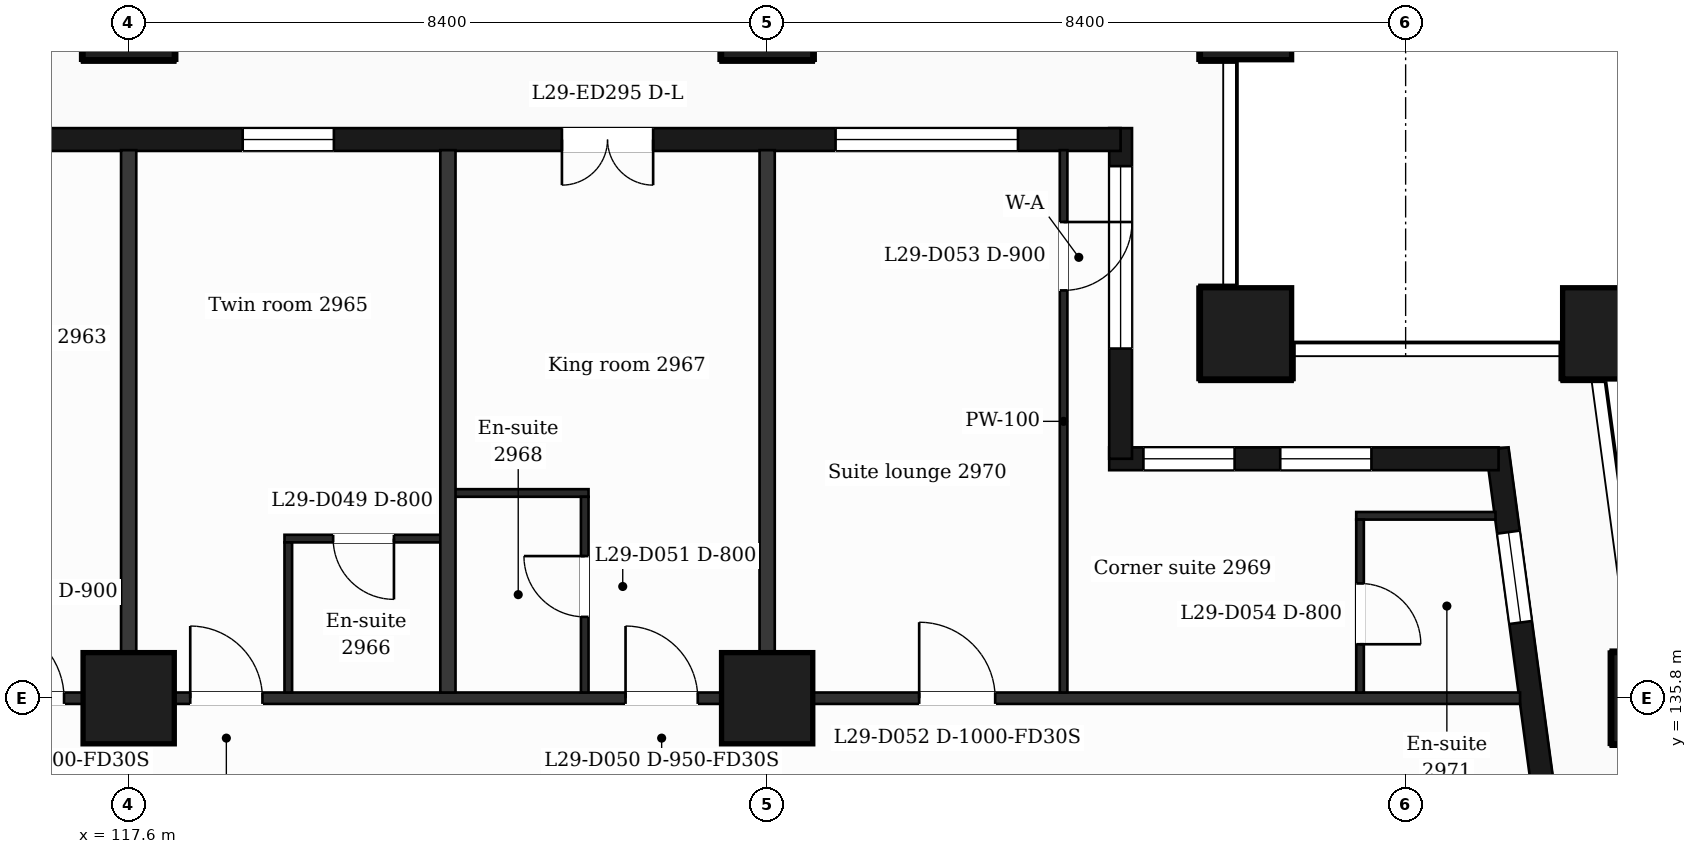
"""IFC4 building model, lengths in metres.
Left out: names, types, materials, properties, quantities, classifications, styles, units other than length and angle.
Written with IfcOpenShell. Run it as: python <this file> out.ifc"""

import sys

from ifc_helpers import new_model, si_unit, direction, frame, frame_2d, origin, origin_2d, place, context, subcontext, project, spatial, rectangle, extrude, element, fill, save


model = new_model("IFC4")
c1 = context("Model", 3, precision=1e-05, world=origin(), true_north=direction((0.0, 1.0)))
c2 = subcontext(c1, "Body", "Model", "MODEL_VIEW")
j1 = project(units=[si_unit("LENGTHUNIT", "METRE"), si_unit("PLANEANGLEUNIT", "RADIAN")], contexts=[c1])
p1 = place(None, origin())
s1 = spatial("IfcSite", under=j1, at=p1, CompositionType="ELEMENT")
p2 = place(p1, origin())
s2 = spatial("IfcBuilding", under=s1, at=p2, CompositionType="ELEMENT")
p3 = place(p2, frame((0.0, 0.0, 124.3)))
s3 = spatial("IfcBuildingStorey", under=s2, at=p3, CompositionType="ELEMENT", Elevation=124.3)
for number, where, z_axis, x_axis in (
    (1, (132.3, 140.6, 0.0), (0.0, 0.0, 1.0), (1.0, 0.0, 0.0)),
    (2, (137.065, 140.6, 0.0), (0.0, 0.0, 1.0), (1.0, 0.0, 0.0)),
    (3, (117.6, 135.8, 0.0), (0.0, 0.0, 1.0), (1.0, 0.0, 0.0)),
    (4, (126.0, 135.8, 0.0), (0.0, 0.0, 1.0), (1.0, 0.0, 0.0)),
    (5, (137.711, 135.8, 0.0), (0.0, 0.0, 1.0), (1.0, 0.0, 0.0)),
    (6, (117.6, 144.8, 0.0), (0.0, 0.0, 1.0), (1.0, 0.0, 0.0)),
    (7, (126.0, 144.8, 0.0), (0.0, 0.0, 1.0), (1.0, 0.0, 0.0)),
    (8, (132.3, 144.8, 0.0), (0.0, 0.0, 1.0), (1.0, 0.0, 0.0)),
):
    element("IfcColumn", number, at=place(p3, frame(where, z_axis=z_axis, x_axis=x_axis)), inside=s3, PredefinedType="COLUMN", context=c2, shape_type="SweptSolid", body=[
        extrude(rectangle(XDim=1.2, YDim=1.2, at=origin_2d()), origin(), (0.0, 0.0, 1.0), 3.7),
    ])
p4 = place(p3, frame((136.504, 132.4, 0.0), z_axis=(0.0, 0.0, 1.0), x_axis=(-0.133399697462, 0.99106231929, 0.0)))
e9 = element("IfcWall", 9, at=p4, inside=s3, PredefinedType="SOLIDWALL", context=c2, shape_type="SweptSolid", body=[
    extrude(rectangle(XDim=6.74, YDim=0.3, at=frame_2d((3.37, 0.0))), origin(), (0.0, 0.0, 1.0), 3.38),
])
p5 = place(p4, frame((1.115, 0.0, 0.0)))
e10 = element("IfcOpeningElement", 10, at=p5, cuts=e9, PredefinedType="OPENING", context=c2, shape_type="SweptSolid", body=[
    extrude(rectangle(XDim=1.2, YDim=2.4, at=frame_2d((0.6, 1.2))), frame((0.0, 0.16, 0.0), z_axis=(0.0, -1.0, 0.0), x_axis=(1.0, 0.0, 0.0)), (0.0, 0.0, 1.0), 0.32),
])
p6 = place(p4, frame((4.436, 0.0, 0.9)))
e11 = element("IfcOpeningElement", 11, at=p6, cuts=e9, PredefinedType="OPENING", context=c2, shape_type="SweptSolid", body=[
    extrude(rectangle(XDim=1.2, YDim=2.1, at=frame_2d((0.6, 1.05))), frame((0.0, 0.16, 0.0), z_axis=(0.0, -1.0, 0.0), x_axis=(1.0, 0.0, 0.0)), (0.0, 0.0, 1.0), 0.32),
])
p7 = place(p3, frame((135.623, 138.95, 0.0), z_axis=(0.0, 0.0, 1.0), x_axis=(-1.0, 0.0, 0.0)))
e12 = element("IfcWall", 12, at=p7, inside=s3, PredefinedType="SOLIDWALL", context=c2, shape_type="SweptSolid", body=[
    extrude(rectangle(XDim=5.123, YDim=0.3, at=frame_2d((2.561, 0.0))), origin(), (0.0, 0.0, 1.0), 3.38),
])
p8 = place(p7, frame((1.673, 0.0, 0.9)))
e13 = element("IfcOpeningElement", 13, at=p8, cuts=e12, PredefinedType="OPENING", context=c2, shape_type="SweptSolid", body=[
    extrude(rectangle(XDim=1.2, YDim=2.1, at=frame_2d((0.6, 1.05))), frame((0.0, 0.16, 0.0), z_axis=(0.0, -1.0, 0.0), x_axis=(1.0, 0.0, 0.0)), (0.0, 0.0, 1.0), 0.32),
])
p9 = place(p7, frame((3.473, 0.0, 0.9)))
e14 = element("IfcOpeningElement", 14, at=p9, cuts=e12, PredefinedType="OPENING", context=c2, shape_type="SweptSolid", body=[
    extrude(rectangle(XDim=1.2, YDim=2.1, at=frame_2d((0.6, 1.05))), frame((0.0, 0.16, 0.0), z_axis=(0.0, -1.0, 0.0), x_axis=(1.0, 0.0, 0.0)), (0.0, 0.0, 1.0), 0.32),
])
p10 = place(p3, frame((130.65, 138.95, 0.0), z_axis=(0.0, 0.0, 1.0), x_axis=(0.0, 1.0, 0.0)))
e15 = element("IfcWall", 15, at=p10, inside=s3, PredefinedType="SOLIDWALL", context=c2, shape_type="SweptSolid", body=[
    extrude(rectangle(XDim=4.35, YDim=0.3, at=frame_2d((2.175, 0.0))), origin(), (0.0, 0.0, 1.0), 3.38),
])
p11 = place(p10, frame((1.45, 0.0, 0.9)))
e16 = element("IfcOpeningElement", 16, at=p11, cuts=e15, PredefinedType="OPENING", context=c2, shape_type="SweptSolid", body=[
    extrude(rectangle(XDim=2.4, YDim=2.1, at=frame_2d((1.2, 1.05))), frame((0.0, 0.16, 0.0), z_axis=(0.0, -1.0, 0.0), x_axis=(1.0, 0.0, 0.0)), (0.0, 0.0, 1.0), 0.32),
])
p12 = place(p3, frame((130.65, 143.15, 0.0), z_axis=(0.0, 0.0, 1.0), x_axis=(-1.0, 0.0, 0.0)))
e17 = element("IfcWall", 17, at=p12, inside=s3, PredefinedType="SOLIDWALL", context=c2, shape_type="SweptSolid", body=[
    extrude(rectangle(XDim=14.25, YDim=0.3, at=frame_2d((7.125, 0.0))), origin(), (0.0, 0.0, 1.0), 3.38),
])
p13 = place(p12, frame((1.35, 0.0, 0.9)))
e18 = element("IfcOpeningElement", 18, at=p13, cuts=e17, PredefinedType="OPENING", context=c2, shape_type="SweptSolid", body=[
    extrude(rectangle(XDim=2.4, YDim=2.1, at=frame_2d((1.2, 1.05))), frame((0.0, 0.16, 0.0), z_axis=(0.0, -1.0, 0.0), x_axis=(1.0, 0.0, 0.0)), (0.0, 0.0, 1.0), 0.32),
])
p14 = place(p12, frame((6.15, 0.0, 0.0)))
e19 = element("IfcOpeningElement", 19, at=p14, cuts=e17, PredefinedType="OPENING", context=c2, shape_type="SweptSolid", body=[
    extrude(rectangle(XDim=1.2, YDim=2.4, at=frame_2d((0.6, 1.2))), frame((0.0, 0.16, 0.0), z_axis=(0.0, -1.0, 0.0), x_axis=(1.0, 0.0, 0.0)), (0.0, 0.0, 1.0), 0.32),
])
p15 = place(p12, frame((10.35, 0.0, 0.9)))
e20 = element("IfcOpeningElement", 20, at=p15, cuts=e17, PredefinedType="OPENING", context=c2, shape_type="SweptSolid", body=[
    extrude(rectangle(XDim=1.2, YDim=2.1, at=frame_2d((0.6, 1.05))), frame((0.0, 0.16, 0.0), z_axis=(0.0, -1.0, 0.0), x_axis=(1.0, 0.0, 0.0)), (0.0, 0.0, 1.0), 0.32),
])
p16 = place(p3, frame((90.895, 135.8, 0.0), z_axis=(0.0, 0.0, 1.0), x_axis=(1.0, 0.0, 0.0)))
e21 = element("IfcWall", 21, at=p16, inside=s3, PredefinedType="PARTITIONING", context=c2, shape_type="SweptSolid", body=[
    extrude(rectangle(XDim=45.011, YDim=0.15, at=frame_2d((22.505, 0.0))), origin(), (0.0, 0.0, 1.0), 3.38),
])
p17 = place(p16, frame((8.005, 0.0, 0.0)))
e22 = element("IfcOpeningElement", 22, at=p17, cuts=e21, PredefinedType="OPENING", context=c2, shape_type="SweptSolid", body=[
    extrude(rectangle(XDim=1.0, YDim=2.1, at=frame_2d((0.5, 1.05))), frame((0.0, 0.085, 0.0), z_axis=(0.0, -1.0, 0.0), x_axis=(1.0, 0.0, 0.0)), (0.0, 0.0, 1.0), 0.17),
])
p18 = place(p16, frame((11.785, 0.0, 0.0)))
e23 = element("IfcOpeningElement", 23, at=p18, cuts=e21, PredefinedType="OPENING", context=c2, shape_type="SweptSolid", body=[
    extrude(rectangle(XDim=0.95, YDim=2.1, at=frame_2d((0.475, 1.05))), frame((0.0, 0.085, 0.0), z_axis=(0.0, -1.0, 0.0), x_axis=(1.0, 0.0, 0.0)), (0.0, 0.0, 1.0), 0.17),
])
p19 = place(p16, frame((14.38, 0.0, 0.0)))
e24 = element("IfcOpeningElement", 24, at=p19, cuts=e21, PredefinedType="OPENING", context=c2, shape_type="SweptSolid", body=[
    extrude(rectangle(XDim=0.95, YDim=2.1, at=frame_2d((0.475, 1.05))), frame((0.0, 0.085, 0.0), z_axis=(0.0, -1.0, 0.0), x_axis=(1.0, 0.0, 0.0)), (0.0, 0.0, 1.0), 0.17),
])
p20 = place(p16, frame((19.075, 0.0, 0.0)))
e25 = element("IfcOpeningElement", 25, at=p20, cuts=e21, PredefinedType="OPENING", context=c2, shape_type="SweptSolid", body=[
    extrude(rectangle(XDim=0.95, YDim=2.1, at=frame_2d((0.475, 1.05))), frame((0.0, 0.085, 0.0), z_axis=(0.0, -1.0, 0.0), x_axis=(1.0, 0.0, 0.0)), (0.0, 0.0, 1.0), 0.17),
])
p21 = place(p16, frame((24.855, 0.0, 0.0)))
e26 = element("IfcOpeningElement", 26, at=p21, cuts=e21, PredefinedType="OPENING", context=c2, shape_type="SweptSolid", body=[
    extrude(rectangle(XDim=1.0, YDim=2.1, at=frame_2d((0.5, 1.05))), frame((0.0, 0.085, 0.0), z_axis=(0.0, -1.0, 0.0), x_axis=(1.0, 0.0, 0.0)), (0.0, 0.0, 1.0), 0.17),
])
p22 = place(p16, frame((27.515, 0.0, 0.0)))
e27 = element("IfcOpeningElement", 27, at=p22, cuts=e21, PredefinedType="OPENING", context=c2, shape_type="SweptSolid", body=[
    extrude(rectangle(XDim=0.95, YDim=2.1, at=frame_2d((0.475, 1.05))), frame((0.0, 0.085, 0.0), z_axis=(0.0, -1.0, 0.0), x_axis=(1.0, 0.0, 0.0)), (0.0, 0.0, 1.0), 0.17),
])
p23 = place(p16, frame((33.242, 0.0, 0.0)))
e28 = element("IfcOpeningElement", 28, at=p23, cuts=e21, PredefinedType="OPENING", context=c2, shape_type="SweptSolid", body=[
    extrude(rectangle(XDim=0.95, YDim=2.1, at=frame_2d((0.475, 1.05))), frame((0.0, 0.085, 0.0), z_axis=(0.0, -1.0, 0.0), x_axis=(1.0, 0.0, 0.0)), (0.0, 0.0, 1.0), 0.17),
])
p24 = place(p16, frame((37.105, 0.0, 0.0)))
e29 = element("IfcOpeningElement", 29, at=p24, cuts=e21, PredefinedType="OPENING", context=c2, shape_type="SweptSolid", body=[
    extrude(rectangle(XDim=1.0, YDim=2.1, at=frame_2d((0.5, 1.05))), frame((0.0, 0.085, 0.0), z_axis=(0.0, -1.0, 0.0), x_axis=(1.0, 0.0, 0.0)), (0.0, 0.0, 1.0), 0.17),
])
p25 = place(p3, frame((119.65, 137.9, 0.0), z_axis=(0.0, 0.0, 1.0), x_axis=(1.0, 0.0, 0.0)))
e30 = element("IfcWall", 30, at=p25, inside=s3, PredefinedType="PARTITIONING", context=c2, shape_type="SweptSolid", body=[
    extrude(rectangle(XDim=2.15, YDim=0.1, at=frame_2d((1.075, 0.0))), origin(), (0.0, 0.0, 1.0), 3.38),
])
p26 = place(p25, frame((0.64, 0.0, 0.0)))
e31 = element("IfcOpeningElement", 31, at=p26, cuts=e30, PredefinedType="OPENING", context=c2, shape_type="SweptSolid", body=[
    extrude(rectangle(XDim=0.8, YDim=2.1, at=frame_2d((0.4, 1.05))), frame((0.0, 0.06, 0.0), z_axis=(0.0, -1.0, 0.0), x_axis=(1.0, 0.0, 0.0)), (0.0, 0.0, 1.0), 0.12),
])
p27 = place(p3, frame((133.75, 138.2, 0.0), z_axis=(0.0, 0.0, 1.0), x_axis=(1.0, 0.0, 0.0)))
e32 = element("IfcWall", 32, at=p27, inside=s3, PredefinedType="PARTITIONING", context=c2, shape_type="SweptSolid", body=[
    extrude(rectangle(XDim=1.832, YDim=0.1, at=frame_2d((0.916, 0.0))), origin(), (0.0, 0.0, 1.0), 3.38),
])
p28 = place(p3, frame((121.8, 138.5, 0.0), z_axis=(0.0, 0.0, 1.0), x_axis=(1.0, 0.0, 0.0)))
e33 = element("IfcWall", 33, at=p28, inside=s3, PredefinedType="PARTITIONING", context=c2, shape_type="SweptSolid", body=[
    extrude(rectangle(XDim=1.85, YDim=0.1, at=frame_2d((0.925, 0.0))), origin(), (0.0, 0.0, 1.0), 3.38),
])
p29 = place(p3, frame((117.6, 135.875, 0.0), z_axis=(0.0, 0.0, 1.0), x_axis=(0.0, 1.0, 0.0)))
e34 = element("IfcWall", 34, at=p29, inside=s3, PredefinedType="PARTITIONING", context=c2, shape_type="SweptSolid", body=[
    extrude(rectangle(XDim=7.135, YDim=0.2, at=frame_2d((3.567, 0.0))), origin(), (0.0, 0.0, 1.0), 3.38),
])
p30 = place(p3, frame((119.7, 135.875, 0.0), z_axis=(0.0, 0.0, 1.0), x_axis=(0.0, 1.0, 0.0)))
e35 = element("IfcWall", 35, at=p30, inside=s3, PredefinedType="PARTITIONING", context=c2, shape_type="SweptSolid", body=[
    extrude(rectangle(XDim=1.975, YDim=0.1, at=frame_2d((0.988, 0.0))), origin(), (0.0, 0.0, 1.0), 3.38),
])
p31 = place(p3, frame((121.8, 135.875, 0.0), z_axis=(0.0, 0.0, 1.0), x_axis=(0.0, 1.0, 0.0)))
e36 = element("IfcWall", 36, at=p31, inside=s3, PredefinedType="PARTITIONING", context=c2, shape_type="SweptSolid", body=[
    extrude(rectangle(XDim=7.135, YDim=0.2, at=frame_2d((3.567, 0.0))), origin(), (0.0, 0.0, 1.0), 3.38),
])
p32 = place(p3, frame((123.6, 135.875, 0.0), z_axis=(0.0, 0.0, 1.0), x_axis=(0.0, 1.0, 0.0)))
e37 = element("IfcWall", 37, at=p32, inside=s3, PredefinedType="PARTITIONING", context=c2, shape_type="SweptSolid", body=[
    extrude(rectangle(XDim=2.575, YDim=0.1, at=frame_2d((1.288, 0.0))), origin(), (0.0, 0.0, 1.0), 3.38),
])
p33 = place(p32, frame((0.995, 0.0, 0.0)))
e38 = element("IfcOpeningElement", 38, at=p33, cuts=e37, PredefinedType="OPENING", context=c2, shape_type="SweptSolid", body=[
    extrude(rectangle(XDim=0.8, YDim=2.1, at=frame_2d((0.4, 1.05))), frame((0.0, 0.06, 0.0), z_axis=(0.0, -1.0, 0.0), x_axis=(1.0, 0.0, 0.0)), (0.0, 0.0, 1.0), 0.12),
])
p34 = place(p3, frame((126.0, 135.875, 0.0), z_axis=(0.0, 0.0, 1.0), x_axis=(0.0, 1.0, 0.0)))
e39 = element("IfcWall", 39, at=p34, inside=s3, PredefinedType="PARTITIONING", context=c2, shape_type="SweptSolid", body=[
    extrude(rectangle(XDim=7.135, YDim=0.2, at=frame_2d((3.567, 0.0))), origin(), (0.0, 0.0, 1.0), 3.38),
])
p35 = place(p3, frame((129.9, 135.875, 0.0), z_axis=(0.0, 0.0, 1.0), x_axis=(0.0, 1.0, 0.0)))
e40 = element("IfcWall", 40, at=p35, inside=s3, PredefinedType="PARTITIONING", context=c2, shape_type="SweptSolid", body=[
    extrude(rectangle(XDim=7.135, YDim=0.1, at=frame_2d((3.567, 0.0))), origin(), (0.0, 0.0, 1.0), 3.38),
])
p36 = place(p35, frame((5.29, 0.0, 0.0)))
e41 = element("IfcOpeningElement", 41, at=p36, cuts=e40, PredefinedType="OPENING", context=c2, shape_type="SweptSolid", body=[
    extrude(rectangle(XDim=0.9, YDim=2.1, at=frame_2d((0.45, 1.05))), frame((0.0, 0.06, 0.0), z_axis=(0.0, -1.0, 0.0), x_axis=(1.0, 0.0, 0.0)), (0.0, 0.0, 1.0), 0.12),
])
p37 = place(p3, frame((133.8, 135.875, 0.0), z_axis=(0.0, 0.0, 1.0), x_axis=(0.0, 1.0, 0.0)))
e42 = element("IfcWall", 42, at=p37, inside=s3, PredefinedType="PARTITIONING", context=c2, shape_type="SweptSolid", body=[
    extrude(rectangle(XDim=2.275, YDim=0.1, at=frame_2d((1.137, 0.0))), origin(), (0.0, 0.0, 1.0), 3.38),
])
p38 = place(p37, frame((0.635, 0.0, 0.0)))
e43 = element("IfcOpeningElement", 43, at=p38, cuts=e42, PredefinedType="OPENING", context=c2, shape_type="SweptSolid", body=[
    extrude(rectangle(XDim=0.8, YDim=2.1, at=frame_2d((0.4, 1.05))), frame((0.0, 0.06, 0.0), z_axis=(0.0, -1.0, 0.0), x_axis=(1.0, 0.0, 0.0)), (0.0, 0.0, 1.0), 0.12),
])
p39 = place(p6, origin())
e44 = element("IfcWindow", 44, at=p39, inside=s3, PartitioningType="SINGLE_PANEL", PredefinedType="WINDOW", context=c2, shape_type="SweptSolid", body=[
    extrude(rectangle(XDim=1.2, YDim=2.1, at=frame_2d((0.6, 1.05))), frame((0.0, 0.03, 0.0), z_axis=(0.0, -1.0, 0.0), x_axis=(1.0, 0.0, 0.0)), (0.0, 0.0, 1.0), 0.06),
])
fill(e11, e44)
p40 = place(p8, origin())
e45 = element("IfcWindow", 45, at=p40, inside=s3, PartitioningType="SINGLE_PANEL", PredefinedType="WINDOW", context=c2, shape_type="SweptSolid", body=[
    extrude(rectangle(XDim=1.2, YDim=2.1, at=frame_2d((0.6, 1.05))), frame((0.0, 0.03, 0.0), z_axis=(0.0, -1.0, 0.0), x_axis=(1.0, 0.0, 0.0)), (0.0, 0.0, 1.0), 0.06),
])
fill(e13, e45)
p41 = place(p9, origin())
e46 = element("IfcWindow", 46, at=p41, inside=s3, PartitioningType="SINGLE_PANEL", PredefinedType="WINDOW", context=c2, shape_type="SweptSolid", body=[
    extrude(rectangle(XDim=1.2, YDim=2.1, at=frame_2d((0.6, 1.05))), frame((0.0, 0.03, 0.0), z_axis=(0.0, -1.0, 0.0), x_axis=(1.0, 0.0, 0.0)), (0.0, 0.0, 1.0), 0.06),
])
fill(e14, e46)
p42 = place(p11, origin())
e47 = element("IfcWindow", 47, at=p42, inside=s3, PartitioningType="SINGLE_PANEL", PredefinedType="WINDOW", context=c2, shape_type="SweptSolid", body=[
    extrude(rectangle(XDim=2.4, YDim=2.1, at=frame_2d((1.2, 1.05))), frame((0.0, 0.03, 0.0), z_axis=(0.0, -1.0, 0.0), x_axis=(1.0, 0.0, 0.0)), (0.0, 0.0, 1.0), 0.06),
])
fill(e16, e47)
p43 = place(p13, origin())
e48 = element("IfcWindow", 48, at=p43, inside=s3, PartitioningType="SINGLE_PANEL", PredefinedType="WINDOW", context=c2, shape_type="SweptSolid", body=[
    extrude(rectangle(XDim=2.4, YDim=2.1, at=frame_2d((1.2, 1.05))), frame((0.0, 0.03, 0.0), z_axis=(0.0, -1.0, 0.0), x_axis=(1.0, 0.0, 0.0)), (0.0, 0.0, 1.0), 0.06),
])
fill(e18, e48)
p44 = place(p14, origin())
e49 = element("IfcDoor", 49, at=p44, inside=s3, OperationType="DOUBLE_DOOR_SINGLE_SWING", PredefinedType="DOOR", context=c2, shape_type="SweptSolid", body=[
    extrude(rectangle(XDim=1.2, YDim=2.4, at=frame_2d((0.6, 1.2))), frame((0.0, 0.025, 0.0), z_axis=(0.0, -1.0, 0.0), x_axis=(1.0, 0.0, 0.0)), (0.0, 0.0, 1.0), 0.05),
])
fill(e19, e49)
p45 = place(p15, origin())
e50 = element("IfcWindow", 50, at=p45, inside=s3, PartitioningType="SINGLE_PANEL", PredefinedType="WINDOW", context=c2, shape_type="SweptSolid", body=[
    extrude(rectangle(XDim=1.2, YDim=2.1, at=frame_2d((0.6, 1.05))), frame((0.0, 0.03, 0.0), z_axis=(0.0, -1.0, 0.0), x_axis=(1.0, 0.0, 0.0)), (0.0, 0.0, 1.0), 0.06),
])
fill(e20, e50)
p46 = place(p21, origin())
e51 = element("IfcDoor", 51, at=p46, inside=s3, OperationType="SINGLE_SWING_LEFT", PredefinedType="DOOR", context=c2, shape_type="SweptSolid", body=[
    extrude(rectangle(XDim=1.0, YDim=2.1, at=frame_2d((0.5, 1.05))), frame((0.0, 0.025, 0.0), z_axis=(0.0, -1.0, 0.0), x_axis=(1.0, 0.0, 0.0)), (0.0, 0.0, 1.0), 0.05),
])
fill(e26, e51)
p47 = place(p22, origin())
e52 = element("IfcDoor", 52, at=p47, inside=s3, OperationType="SINGLE_SWING_LEFT", PredefinedType="DOOR", context=c2, shape_type="SweptSolid", body=[
    extrude(rectangle(XDim=0.95, YDim=2.1, at=frame_2d((0.475, 1.05))), frame((0.0, 0.025, 0.0), z_axis=(0.0, -1.0, 0.0), x_axis=(1.0, 0.0, 0.0)), (0.0, 0.0, 1.0), 0.05),
])
fill(e27, e52)
p48 = place(p26, origin())
e53 = element("IfcDoor", 53, at=p48, inside=s3, OperationType="SINGLE_SWING_RIGHT", PredefinedType="DOOR", context=c2, shape_type="SweptSolid", body=[
    extrude(rectangle(XDim=0.8, YDim=2.1, at=frame_2d((0.4, 1.05))), frame((0.0, 0.025, 0.0), z_axis=(0.0, -1.0, 0.0), x_axis=(1.0, 0.0, 0.0)), (0.0, 0.0, 1.0), 0.05),
])
fill(e31, e53)
p49 = place(p23, origin())
e54 = element("IfcDoor", 54, at=p49, inside=s3, OperationType="SINGLE_SWING_LEFT", PredefinedType="DOOR", context=c2, shape_type="SweptSolid", body=[
    extrude(rectangle(XDim=0.95, YDim=2.1, at=frame_2d((0.475, 1.05))), frame((0.0, 0.025, 0.0), z_axis=(0.0, -1.0, 0.0), x_axis=(1.0, 0.0, 0.0)), (0.0, 0.0, 1.0), 0.05),
])
fill(e28, e54)
p50 = place(p33, origin())
e55 = element("IfcDoor", 55, at=p50, inside=s3, OperationType="SINGLE_SWING_RIGHT", PredefinedType="DOOR", context=c2, shape_type="SweptSolid", body=[
    extrude(rectangle(XDim=0.8, YDim=2.1, at=frame_2d((0.4, 1.05))), frame((0.0, 0.025, 0.0), z_axis=(0.0, -1.0, 0.0), x_axis=(1.0, 0.0, 0.0)), (0.0, 0.0, 1.0), 0.05),
])
fill(e38, e55)
p51 = place(p24, origin())
e56 = element("IfcDoor", 56, at=p51, inside=s3, OperationType="SINGLE_SWING_LEFT", PredefinedType="DOOR", context=c2, shape_type="SweptSolid", body=[
    extrude(rectangle(XDim=1.0, YDim=2.1, at=frame_2d((0.5, 1.05))), frame((0.0, 0.025, 0.0), z_axis=(0.0, -1.0, 0.0), x_axis=(1.0, 0.0, 0.0)), (0.0, 0.0, 1.0), 0.05),
])
fill(e29, e56)
p52 = place(p36, origin())
e57 = element("IfcDoor", 57, at=p52, inside=s3, OperationType="SINGLE_SWING_RIGHT", PredefinedType="DOOR", context=c2, shape_type="SweptSolid", body=[
    extrude(rectangle(XDim=0.9, YDim=2.1, at=frame_2d((0.45, 1.05))), frame((0.0, 0.025, 0.0), z_axis=(0.0, -1.0, 0.0), x_axis=(1.0, 0.0, 0.0)), (0.0, 0.0, 1.0), 0.05),
])
fill(e41, e57)
p53 = place(p38, origin())
e58 = element("IfcDoor", 58, at=p53, inside=s3, OperationType="SINGLE_SWING_LEFT", PredefinedType="DOOR", context=c2, shape_type="SweptSolid", body=[
    extrude(rectangle(XDim=0.8, YDim=2.1, at=frame_2d((0.4, 1.05))), frame((0.0, 0.025, 0.0), z_axis=(0.0, -1.0, 0.0), x_axis=(1.0, 0.0, 0.0)), (0.0, 0.0, 1.0), 0.05),
])
fill(e43, e58)
save(model, sys.argv[1])
